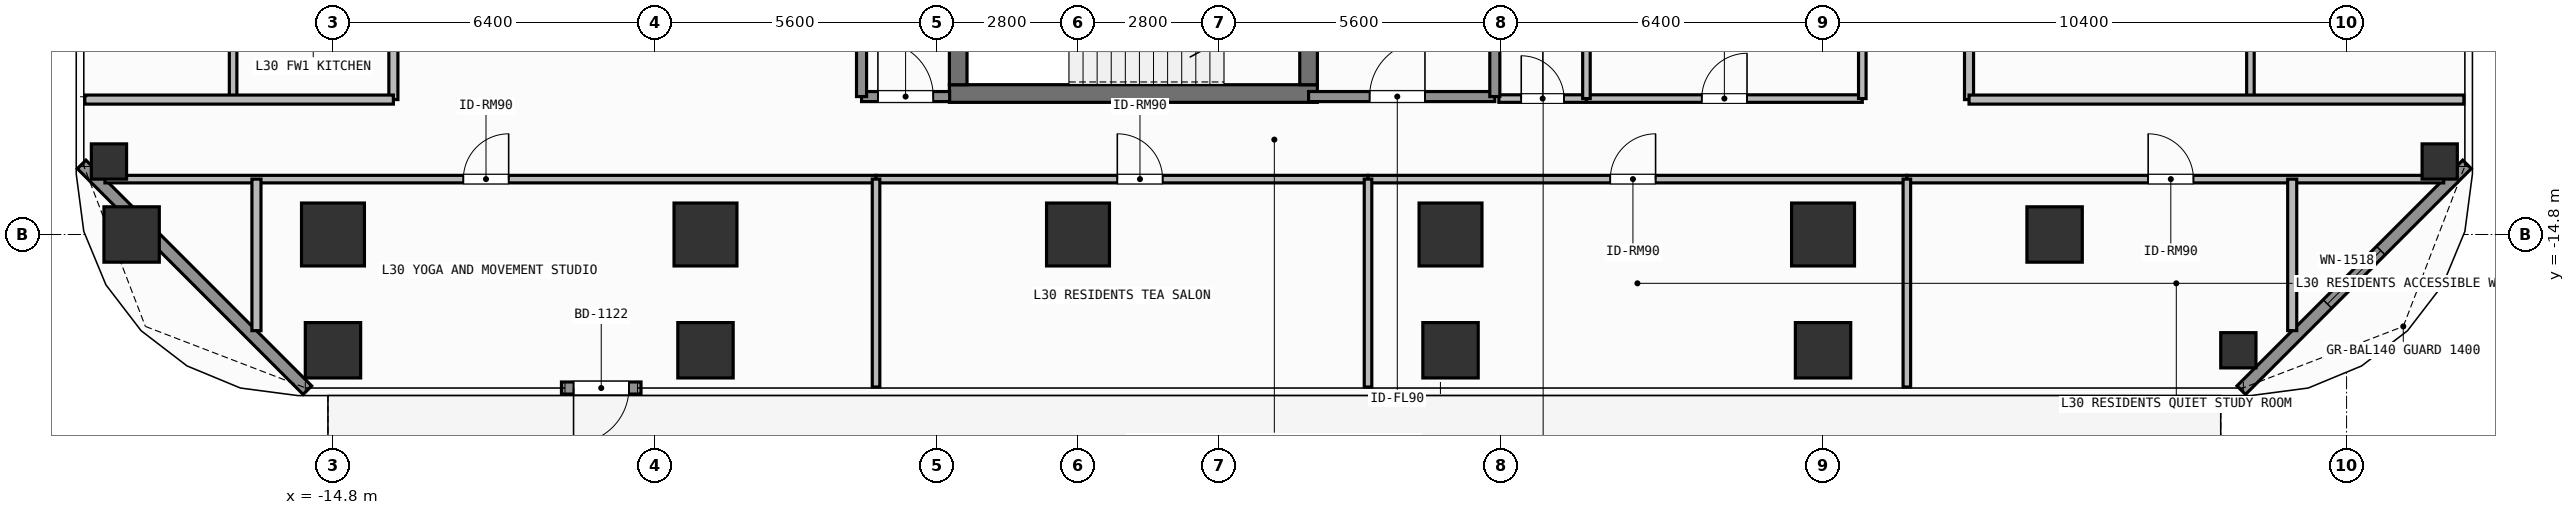
"""IFC4 building model, lengths in metres.
Left out: names, types, materials, properties, quantities, classifications, styles, units other than length and angle.
Written with IfcOpenShell. Run it as: python <this file> out.ifc"""

import sys

from ifc_helpers import new_model, si_unit, direction, frame, frame_2d, origin, origin_2d, place, context, subcontext, project, spatial, rectangle, hollow_rectangle, extrude, element, fill, save


model = new_model("IFC4")
c1 = context("Model", 3, precision=1e-05, world=origin(), true_north=direction((0.0, 1.0)))
c2 = subcontext(c1, "Body", "Model", "MODEL_VIEW")
j1 = project(units=[si_unit("LENGTHUNIT", "METRE"), si_unit("PLANEANGLEUNIT", "RADIAN")], contexts=[c1])
p1 = place(None, origin())
s1 = spatial("IfcSite", under=j1, at=p1, CompositionType="ELEMENT")
p2 = place(p1, origin())
s2 = spatial("IfcBuilding", under=s1, at=p2, CompositionType="ELEMENT")
p3 = place(p2, frame((0.0, 0.0, 121.2)))
s3 = spatial("IfcBuildingStorey", under=s2, at=p3, CompositionType="ELEMENT", Elevation=121.2)
p4 = place(p3, frame((-2.555, -12.0, 0.0), z_axis=(0.0, 0.0, 1.0), x_axis=(1.0, 0.0, 0.0)))
e1 = element("IfcWall", 1, at=p4, inside=s3, PredefinedType="SHEAR", context=c2, shape_type="SweptSolid", body=[
    extrude(rectangle(XDim=7.31, YDim=0.35, at=frame_2d((3.655, 0.0))), origin(), (0.0, 0.0, 1.0), 3.9),
])
p5 = place(p3, frame((-2.38, -11.825, 0.0), z_axis=(0.0, 0.0, 1.0), x_axis=(0.0, 1.0, 0.0)))
e2 = element("IfcWall", 2, at=p5, inside=s3, PredefinedType="SHEAR", context=c2, shape_type="SweptSolid", body=[
    extrude(rectangle(XDim=2.925, YDim=0.35, at=frame_2d((1.462, 0.0))), origin(), (0.0, 0.0, 1.0), 3.9),
])
p6 = place(p3, frame((4.58, -8.9, 0.0), z_axis=(0.0, 0.0, 1.0), x_axis=(0.0, -1.0, 0.0)))
e3 = element("IfcWall", 3, at=p6, inside=s3, PredefinedType="SHEAR", context=c2, shape_type="SweptSolid", body=[
    extrude(rectangle(XDim=2.925, YDim=0.35, at=frame_2d((1.462, 0.0))), origin(), (0.0, 0.0, 1.0), 3.9),
])
p7 = place(p6, frame((0.913, 0.0, 0.0)))
e4 = element("IfcOpeningElement", 4, at=p7, cuts=e3, PredefinedType="OPENING", context=c2, shape_type="SweptSolid", body=[
    extrude(rectangle(XDim=1.1, YDim=2.15, at=frame_2d((0.55, 1.075))), frame((0.0, 0.185, 0.0), z_axis=(0.0, -1.0, 0.0), x_axis=(1.0, 0.0, 0.0)), (0.0, 0.0, 1.0), 0.37),
])
for number, where, z_axis, x_axis in (
    (5, (-14.8, -14.8, 0.0), (0.0, 0.0, 1.0), (1.0, 0.0, 0.0)),
    (6, (-7.4, -14.8, 0.0), (0.0, 0.0, 1.0), (1.0, 0.0, 0.0)),
    (7, (0.0, -14.8, 0.0), (0.0, 0.0, 1.0), (1.0, 0.0, 0.0)),
    (8, (7.4, -14.8, 0.0), (0.0, 0.0, 1.0), (1.0, 0.0, 0.0)),
    (9, (14.8, -14.8, 0.0), (0.0, 0.0, 1.0), (1.0, 0.0, 0.0)),
):
    element("IfcColumn", number, at=place(p3, frame(where, z_axis=z_axis, x_axis=x_axis)), inside=s3, PredefinedType="COLUMN", context=c2, shape_type="SweptSolid", body=[
        extrude(rectangle(XDim=1.25, YDim=1.25, at=origin_2d()), origin(), (0.0, 0.0, 1.0), 3.9),
    ])
for number, where, z_axis, x_axis in (
    (10, (-18.8, -14.8, 0.0), (0.0, 0.0, 1.0), (1.0, 0.0, 0.0)),
    (11, (19.4, -14.8, 0.0), (0.0, 0.0, 1.0), (1.0, 0.0, 0.0)),
    (12, (-14.8, -17.1, 0.0), (0.0, 0.0, 1.0), (1.0, 0.0, 0.0)),
    (13, (-7.4, -17.1, 0.0), (0.0, 0.0, 1.0), (1.0, 0.0, 0.0)),
    (14, (7.4, -17.1, 0.0), (0.0, 0.0, 1.0), (1.0, 0.0, 0.0)),
    (15, (14.8, -17.1, 0.0), (0.0, 0.0, 1.0), (1.0, 0.0, 0.0)),
):
    element("IfcColumn", number, at=place(p3, frame(where, z_axis=z_axis, x_axis=x_axis)), inside=s3, PredefinedType="COLUMN", context=c2, shape_type="SweptSolid", body=[
        extrude(rectangle(XDim=1.1, YDim=1.1, at=origin_2d()), origin(), (0.0, 0.0, 1.0), 3.9),
    ])
for number, where, z_axis, x_axis in (
    (16, (23.05, -17.1, 0.0), (0.0, 0.0, 1.0), (1.0, 0.0, 0.0)),
    (17, (-19.25, -13.35, 0.0), (0.0, 0.0, 1.0), (1.0, 0.0, 0.0)),
    (18, (27.05, -13.35, 0.0), (0.0, 0.0, 1.0), (1.0, 0.0, 0.0)),
):
    element("IfcColumn", number, at=place(p3, frame(where, z_axis=z_axis, x_axis=x_axis)), inside=s3, PredefinedType="COLUMN", context=c2, shape_type="SweptSolid", body=[
        extrude(hollow_rectangle(XDim=0.7, YDim=0.7, WallThickness=0.032, at=origin_2d()), origin(), (0.0, 0.0, 1.0), 3.9),
    ])
p8 = place(p3, frame((-8.681, -17.85, 0.0), z_axis=(0.0, 0.0, 1.0), x_axis=(-1.0, 0.0, 0.0)))
e19 = element("IfcWall", 19, at=p8, inside=s3, PredefinedType="SOLIDWALL", context=c2, shape_type="SweptSolid", body=[
    extrude(rectangle(XDim=1.58, YDim=0.24, at=frame_2d((0.79, 0.0))), origin(), (0.0, 0.0, 1.0), 3.68),
])
p9 = place(p8, frame((0.24, 0.0, 0.0)))
e20 = element("IfcOpeningElement", 20, at=p9, cuts=e19, PredefinedType="OPENING", context=c2, shape_type="SweptSolid", body=[
    extrude(rectangle(XDim=1.1, YDim=2.2, at=frame_2d((0.55, 1.1))), frame((0.0, 0.13, 0.0), z_axis=(0.0, -1.0, 0.0), x_axis=(1.0, 0.0, 0.0)), (0.0, 0.0, 1.0), 0.26),
])
p10 = place(p3, frame((-15.308, -17.892, 0.0), z_axis=(0.0, 0.0, 1.0), x_axis=(-0.707126027686, 0.707087534163, 0.0)))
e21 = element("IfcWall", 21, at=p10, inside=s3, PredefinedType="SOLIDWALL", context=c2, shape_type="SweptSolid", body=[
    extrude(rectangle(XDim=6.342, YDim=0.24, at=frame_2d((3.171, 0.0))), origin(), (0.0, 0.0, 1.0), 3.68),
])
p11 = place(p3, frame((27.592, -13.408, 0.0), z_axis=(0.0, 0.0, 1.0), x_axis=(-0.707106781187, -0.707106781187, 0.0)))
e22 = element("IfcWall", 22, at=p11, inside=s3, PredefinedType="SOLIDWALL", context=c2, shape_type="SweptSolid", body=[
    extrude(rectangle(XDim=6.342, YDim=0.24, at=frame_2d((3.171, 0.0))), origin(), (0.0, 0.0, 1.0), 3.68),
])
p12 = place(p11, frame((2.421, 0.0, 0.8)))
e23 = element("IfcOpeningElement", 23, at=p12, cuts=e22, PredefinedType="OPENING", context=c2, shape_type="SweptSolid", body=[
    extrude(rectangle(XDim=1.5, YDim=1.85, at=frame_2d((0.75, 0.925))), frame((0.0, 0.13, 0.0), z_axis=(0.0, -1.0, 0.0), x_axis=(1.0, 0.0, 0.0)), (0.0, 0.0, 1.0), 0.26),
])
p13 = place(p3, frame((4.58, -12.06, 0.0), z_axis=(0.0, 0.0, 1.0), x_axis=(1.0, 0.0, 0.0)))
e24 = element("IfcWall", 24, at=p13, inside=s3, PredefinedType="SOLIDWALL", context=c2, shape_type="SweptSolid", body=[
    extrude(rectangle(XDim=3.7, YDim=0.2, at=frame_2d((1.85, 0.0))), origin(), (0.0, 0.0, 1.0), 3.68),
])
p14 = place(p13, frame((1.212, 0.0, 0.0)))
e25 = element("IfcOpeningElement", 25, at=p14, cuts=e24, PredefinedType="OPENING", context=c2, shape_type="SweptSolid", body=[
    extrude(rectangle(XDim=1.1, YDim=2.15, at=frame_2d((0.55, 1.075))), frame((0.0, 0.11, 0.0), z_axis=(0.0, -1.0, 0.0), x_axis=(1.0, 0.0, 0.0)), (0.0, 0.0, 1.0), 0.22),
])
p15 = place(p3, frame((-4.3, -12.06, 0.0), z_axis=(0.0, 0.0, 1.0), x_axis=(1.0, 0.0, 0.0)))
e26 = element("IfcWall", 26, at=p15, inside=s3, PredefinedType="SOLIDWALL", context=c2, shape_type="SweptSolid", body=[
    extrude(rectangle(XDim=1.75, YDim=0.2, at=frame_2d((0.875, 0.0))), origin(), (0.0, 0.0, 1.0), 3.68),
])
p16 = place(p15, frame((0.325, 0.0, 0.0)))
e27 = element("IfcOpeningElement", 27, at=p16, cuts=e26, PredefinedType="OPENING", context=c2, shape_type="SweptSolid", body=[
    extrude(rectangle(XDim=1.1, YDim=2.15, at=frame_2d((0.55, 1.075))), frame((0.0, 0.11, 0.0), z_axis=(0.0, -1.0, 0.0), x_axis=(1.0, 0.0, 0.0)), (0.0, 0.0, 1.0), 0.22),
])
p17 = place(p3, frame((8.36, -12.1, 0.0), z_axis=(0.0, 0.0, 1.0), x_axis=(1.0, 0.0, 0.0)))
e28 = element("IfcWall", 28, at=p17, inside=s3, PredefinedType="PARTITIONING", context=c2, shape_type="SweptSolid", body=[
    extrude(rectangle(XDim=1.74, YDim=0.15, at=frame_2d((0.87, 0.0))), origin(), (0.0, 0.0, 1.0), 3.68),
])
p18 = place(p17, frame((0.445, 0.0, 0.0)))
e29 = element("IfcOpeningElement", 29, at=p18, cuts=e28, PredefinedType="OPENING", context=c2, shape_type="SweptSolid", body=[
    extrude(rectangle(XDim=0.85, YDim=2.1, at=frame_2d((0.425, 1.05))), frame((0.0, 0.085, 0.0), z_axis=(0.0, -1.0, 0.0), x_axis=(1.0, 0.0, 0.0)), (0.0, 0.0, 1.0), 0.17),
])
p19 = place(p3, frame((10.1, -12.1, 0.0), z_axis=(0.0, 0.0, 1.0), x_axis=(1.0, 0.0, 0.0)))
e30 = element("IfcWall", 30, at=p19, inside=s3, PredefinedType="PARTITIONING", context=c2, shape_type="SweptSolid", body=[
    extrude(rectangle(XDim=5.48, YDim=0.15, at=frame_2d((2.74, 0.0))), origin(), (0.0, 0.0, 1.0), 3.68),
])
p20 = place(p19, frame((2.29, 0.0, 0.0)))
e31 = element("IfcOpeningElement", 31, at=p20, cuts=e30, PredefinedType="OPENING", context=c2, shape_type="SweptSolid", body=[
    extrude(rectangle(XDim=0.9, YDim=2.1, at=frame_2d((0.45, 1.05))), frame((0.0, 0.085, 0.0), z_axis=(0.0, -1.0, 0.0), x_axis=(1.0, 0.0, 0.0)), (0.0, 0.0, 1.0), 0.17),
])
p21 = place(p3, frame((-19.33, -13.7, 0.0), z_axis=(0.0, 0.0, 1.0), x_axis=(1.0, 0.0, 0.0)))
e32 = element("IfcWall", 32, at=p21, inside=s3, PredefinedType="PARTITIONING", context=c2, shape_type="SweptSolid", body=[
    extrude(rectangle(XDim=15.318, YDim=0.15, at=frame_2d((7.659, 0.0))), origin(), (0.0, 0.0, 1.0), 3.68),
])
p22 = place(p21, frame((7.12, 0.0, 0.0)))
e33 = element("IfcOpeningElement", 33, at=p22, cuts=e32, PredefinedType="OPENING", context=c2, shape_type="SweptSolid", body=[
    extrude(rectangle(XDim=0.9, YDim=2.1, at=frame_2d((0.45, 1.05))), frame((0.0, 0.085, 0.0), z_axis=(0.0, -1.0, 0.0), x_axis=(1.0, 0.0, 0.0)), (0.0, 0.0, 1.0), 0.17),
])
p23 = place(p3, frame((-4.012, -13.7, 0.0), z_axis=(0.0, 0.0, 1.0), x_axis=(1.0, 0.0, 0.0)))
e34 = element("IfcWall", 34, at=p23, inside=s3, PredefinedType="PARTITIONING", context=c2, shape_type="SweptSolid", body=[
    extrude(rectangle(XDim=9.773, YDim=0.15, at=frame_2d((4.886, 0.0))), origin(), (0.0, 0.0, 1.0), 3.68),
])
p24 = place(p23, frame((4.793, 0.0, 0.0)))
e35 = element("IfcOpeningElement", 35, at=p24, cuts=e34, PredefinedType="OPENING", context=c2, shape_type="SweptSolid", body=[
    extrude(rectangle(XDim=0.9, YDim=2.1, at=frame_2d((0.45, 1.05))), frame((0.0, 0.085, 0.0), z_axis=(0.0, -1.0, 0.0), x_axis=(1.0, 0.0, 0.0)), (0.0, 0.0, 1.0), 0.17),
])
p25 = place(p3, frame((5.761, -13.7, 0.0), z_axis=(0.0, 0.0, 1.0), x_axis=(1.0, 0.0, 0.0)))
e36 = element("IfcWall", 36, at=p25, inside=s3, PredefinedType="PARTITIONING", context=c2, shape_type="SweptSolid", body=[
    extrude(rectangle(XDim=10.704, YDim=0.15, at=frame_2d((5.352, 0.0))), origin(), (0.0, 0.0, 1.0), 3.68),
])
p26 = place(p25, frame((4.812, 0.0, 0.0)))
e37 = element("IfcOpeningElement", 37, at=p26, cuts=e36, PredefinedType="OPENING", context=c2, shape_type="SweptSolid", body=[
    extrude(rectangle(XDim=0.9, YDim=2.1, at=frame_2d((0.45, 1.05))), frame((0.0, 0.085, 0.0), z_axis=(0.0, -1.0, 0.0), x_axis=(1.0, 0.0, 0.0)), (0.0, 0.0, 1.0), 0.17),
])
p27 = place(p3, frame((16.465, -13.7, 0.0), z_axis=(0.0, 0.0, 1.0), x_axis=(1.0, 0.0, 0.0)))
e38 = element("IfcWall", 38, at=p27, inside=s3, PredefinedType="PARTITIONING", context=c2, shape_type="SweptSolid", body=[
    extrude(rectangle(XDim=10.665, YDim=0.15, at=frame_2d((5.333, 0.0))), origin(), (0.0, 0.0, 1.0), 3.68),
])
p28 = place(p27, frame((4.793, 0.0, 0.0)))
e39 = element("IfcOpeningElement", 39, at=p28, cuts=e38, PredefinedType="OPENING", context=c2, shape_type="SweptSolid", body=[
    extrude(rectangle(XDim=0.9, YDim=2.1, at=frame_2d((0.45, 1.05))), frame((0.0, 0.085, 0.0), z_axis=(0.0, -1.0, 0.0), x_axis=(1.0, 0.0, 0.0)), (0.0, 0.0, 1.0), 0.17),
])
p29 = place(p3, frame((-13.6, -12.12, 0.0), z_axis=(0.0, 0.0, 1.0), x_axis=(0.0, 1.0, 0.0)))
e40 = element("IfcWall", 40, at=p29, inside=s3, PredefinedType="PARTITIONING", context=c2, shape_type="SweptSolid", body=[
    extrude(rectangle(XDim=13.138, YDim=0.18, at=frame_2d((6.569, 0.0))), origin(), (0.0, 0.0, 1.0), 3.68),
])
p30 = place(p29, frame((5.711, 0.0, 0.0)))
e41 = element("IfcOpeningElement", 41, at=p30, cuts=e40, PredefinedType="OPENING", context=c2, shape_type="SweptSolid", body=[
    extrude(rectangle(XDim=1.0, YDim=2.2, at=frame_2d((0.5, 1.1))), frame((0.0, 0.1, 0.0), z_axis=(0.0, -1.0, 0.0), x_axis=(1.0, 0.0, 0.0)), (0.0, 0.0, 1.0), 0.2),
])
p31 = place(p3, frame((17.7, -12.12, 0.0), z_axis=(0.0, 0.0, 1.0), x_axis=(0.0, 1.0, 0.0)))
e42 = element("IfcWall", 42, at=p31, inside=s3, PredefinedType="PARTITIONING", context=c2, shape_type="SweptSolid", body=[
    extrude(rectangle(XDim=24.24, YDim=0.18, at=frame_2d((12.12, 0.0))), origin(), (0.0, 0.0, 1.0), 3.68),
])
p32 = place(p31, frame((11.62, 0.0, 0.0)))
e43 = element("IfcOpeningElement", 43, at=p32, cuts=e42, PredefinedType="OPENING", context=c2, shape_type="SweptSolid", body=[
    extrude(rectangle(XDim=1.0, YDim=2.2, at=frame_2d((0.5, 1.1))), frame((0.0, 0.1, 0.0), z_axis=(0.0, -1.0, 0.0), x_axis=(1.0, 0.0, 0.0)), (0.0, 0.0, 1.0), 0.2),
])
for number, where, z_axis, x_axis in (
    (44, (8.28, -12.06, 0.0), (0.0, 0.0, 1.0), (0.0, 1.0, 0.0)),
    (45, (-4.3, -12.06, 0.0), (0.0, 0.0, 1.0), (0.0, 1.0, 0.0)),
):
    element("IfcWall", number, at=place(p3, frame(where, z_axis=z_axis, x_axis=x_axis)), inside=s3, PredefinedType="SOLIDWALL", context=c2, shape_type="SweptSolid", body=[
        extrude(rectangle(XDim=3.185, YDim=0.2, at=frame_2d((1.593, 0.0))), origin(), (0.0, 0.0, 1.0), 3.68),
    ])
p33 = place(p3, frame((10.1, -12.1, 0.0), z_axis=(0.0, 0.0, 1.0), x_axis=(0.0, 1.0, 0.0)))
e46 = element("IfcWall", 46, at=p33, inside=s3, PredefinedType="PARTITIONING", context=c2, shape_type="SweptSolid", body=[
    extrude(rectangle(XDim=2.35, YDim=0.15, at=frame_2d((1.175, 0.0))), origin(), (0.0, 0.0, 1.0), 3.68),
])
p34 = place(p3, frame((15.58, -12.1, 0.0), z_axis=(0.0, 0.0, 1.0), x_axis=(0.0, 1.0, 0.0)))
e47 = element("IfcWall", 47, at=p34, inside=s3, PredefinedType="PARTITIONING", context=c2, shape_type="SweptSolid", body=[
    extrude(rectangle(XDim=6.25, YDim=0.15, at=frame_2d((3.125, 0.0))), origin(), (0.0, 0.0, 1.0), 3.68),
])
for number, where, z_axis, x_axis in (
    (48, (-16.32, -16.71, 0.0), (0.0, 0.0, 1.0), (0.0, 1.0, 0.0)),
    (49, (24.12, -16.71, 0.0), (0.0, 0.0, 1.0), (0.0, 1.0, 0.0)),
):
    element("IfcWall", number, at=place(p3, frame(where, z_axis=z_axis, x_axis=x_axis)), inside=s3, PredefinedType="PARTITIONING", context=c2, shape_type="SweptSolid", body=[
        extrude(rectangle(XDim=3.01, YDim=0.18, at=frame_2d((1.505, 0.0))), origin(), (0.0, 0.0, 1.0), 3.68),
    ])
for number, where, z_axis, x_axis in (
    (50, (-4.012, -17.83, 0.0), (0.0, 0.0, 1.0), (0.0, 1.0, 0.0)),
    (51, (5.761, -17.83, 0.0), (0.0, 0.0, 1.0), (0.0, 1.0, 0.0)),
    (52, (16.465, -17.83, 0.0), (0.0, 0.0, 1.0), (0.0, 1.0, 0.0)),
):
    element("IfcWall", number, at=place(p3, frame(where, z_axis=z_axis, x_axis=x_axis)), inside=s3, PredefinedType="PARTITIONING", context=c2, shape_type="SweptSolid", body=[
        extrude(rectangle(XDim=4.13, YDim=0.15, at=frame_2d((2.065, 0.0))), origin(), (0.0, 0.0, 1.0), 3.68),
    ])
p35 = place(p3, frame((-16.784, -12.12, 0.0), z_axis=(0.0, 0.0, 1.0), x_axis=(0.0, 1.0, 0.0)))
e53 = element("IfcWall", 53, at=p35, inside=s3, PredefinedType="PARTITIONING", context=c2, shape_type="SweptSolid", body=[
    extrude(rectangle(XDim=3.726, YDim=0.15, at=frame_2d((1.863, 0.0))), origin(), (0.0, 0.0, 1.0), 3.68),
])
p36 = place(p3, frame((-19.73, -12.12, 0.0), z_axis=(0.0, 0.0, 1.0), x_axis=(1.0, 0.0, 0.0)))
e54 = element("IfcWall", 54, at=p36, inside=s3, PredefinedType="PARTITIONING", context=c2, shape_type="SweptSolid", body=[
    extrude(rectangle(XDim=6.13, YDim=0.18, at=frame_2d((3.065, 0.0))), origin(), (0.0, 0.0, 1.0), 3.68),
])
p37 = place(p3, frame((23.29, -12.12, 0.0), z_axis=(0.0, 0.0, 1.0), x_axis=(0.0, 1.0, 0.0)))
e55 = element("IfcWall", 55, at=p37, inside=s3, PredefinedType="PARTITIONING", context=c2, shape_type="SweptSolid", body=[
    extrude(rectangle(XDim=6.684, YDim=0.15, at=frame_2d((3.342, 0.0))), origin(), (0.0, 0.0, 1.0), 3.68),
])
p38 = place(p3, frame((17.7, -12.12, 0.0), z_axis=(0.0, 0.0, 1.0), x_axis=(1.0, 0.0, 0.0)))
e56 = element("IfcWall", 56, at=p38, inside=s3, PredefinedType="PARTITIONING", context=c2, shape_type="SweptSolid", body=[
    extrude(rectangle(XDim=9.83, YDim=0.18, at=frame_2d((4.915, 0.0))), origin(), (0.0, 0.0, 1.0), 3.68),
])
p39 = place(p9, origin())
e57 = element("IfcDoor", 57, at=p39, inside=s3, OperationType="SINGLE_SWING_RIGHT", PredefinedType="DOOR", context=c2, shape_type="SweptSolid", body=[
    extrude(rectangle(XDim=1.1, YDim=2.2, at=frame_2d((0.55, 1.1))), frame((0.0, 0.025, 0.0), z_axis=(0.0, -1.0, 0.0), x_axis=(1.0, 0.0, 0.0)), (0.0, 0.0, 1.0), 0.05),
])
fill(e20, e57)
p40 = place(p12, origin())
e58 = element("IfcWindow", 58, at=p40, inside=s3, PartitioningType="SINGLE_PANEL", PredefinedType="WINDOW", context=c2, shape_type="SweptSolid", body=[
    extrude(rectangle(XDim=1.5, YDim=1.85, at=frame_2d((0.75, 0.925))), frame((0.0, 0.03, 0.0), z_axis=(0.0, -1.0, 0.0), x_axis=(1.0, 0.0, 0.0)), (0.0, 0.0, 1.0), 0.06),
])
fill(e23, e58)
p41 = place(p14, origin())
e59 = element("IfcDoor", 59, at=p41, inside=s3, OperationType="SINGLE_SWING_RIGHT", PredefinedType="DOOR", context=c2, shape_type="SweptSolid", body=[
    extrude(rectangle(XDim=1.1, YDim=2.15, at=frame_2d((0.55, 1.075))), frame((0.0, 0.025, 0.0), z_axis=(0.0, -1.0, 0.0), x_axis=(1.0, 0.0, 0.0)), (0.0, 0.0, 1.0), 0.05),
])
fill(e25, e59)
p42 = place(p16, origin())
e60 = element("IfcDoor", 60, at=p42, inside=s3, OperationType="SINGLE_SWING_LEFT", PredefinedType="DOOR", context=c2, shape_type="SweptSolid", body=[
    extrude(rectangle(XDim=1.1, YDim=2.15, at=frame_2d((0.55, 1.075))), frame((0.0, 0.025, 0.0), z_axis=(0.0, -1.0, 0.0), x_axis=(1.0, 0.0, 0.0)), (0.0, 0.0, 1.0), 0.05),
])
fill(e27, e60)
p43 = place(p18, origin())
e61 = element("IfcDoor", 61, at=p43, inside=s3, OperationType="SINGLE_SWING_LEFT", PredefinedType="DOOR", context=c2, shape_type="SweptSolid", body=[
    extrude(rectangle(XDim=0.85, YDim=2.1, at=frame_2d((0.425, 1.05))), frame((0.0, 0.025, 0.0), z_axis=(0.0, -1.0, 0.0), x_axis=(1.0, 0.0, 0.0)), (0.0, 0.0, 1.0), 0.05),
])
fill(e29, e61)
p44 = place(p20, origin())
e62 = element("IfcDoor", 62, at=p44, inside=s3, OperationType="SINGLE_SWING_RIGHT", PredefinedType="DOOR", context=c2, shape_type="SweptSolid", body=[
    extrude(rectangle(XDim=0.9, YDim=2.1, at=frame_2d((0.45, 1.05))), frame((0.0, 0.025, 0.0), z_axis=(0.0, -1.0, 0.0), x_axis=(1.0, 0.0, 0.0)), (0.0, 0.0, 1.0), 0.05),
])
fill(e31, e62)
p45 = place(p22, origin())
e63 = element("IfcDoor", 63, at=p45, inside=s3, OperationType="SINGLE_SWING_RIGHT", PredefinedType="DOOR", context=c2, shape_type="SweptSolid", body=[
    extrude(rectangle(XDim=0.9, YDim=2.1, at=frame_2d((0.45, 1.05))), frame((0.0, 0.025, 0.0), z_axis=(0.0, -1.0, 0.0), x_axis=(1.0, 0.0, 0.0)), (0.0, 0.0, 1.0), 0.05),
])
fill(e33, e63)
p46 = place(p24, origin())
e64 = element("IfcDoor", 64, at=p46, inside=s3, OperationType="SINGLE_SWING_LEFT", PredefinedType="DOOR", context=c2, shape_type="SweptSolid", body=[
    extrude(rectangle(XDim=0.9, YDim=2.1, at=frame_2d((0.45, 1.05))), frame((0.0, 0.025, 0.0), z_axis=(0.0, -1.0, 0.0), x_axis=(1.0, 0.0, 0.0)), (0.0, 0.0, 1.0), 0.05),
])
fill(e35, e64)
p47 = place(p26, origin())
e65 = element("IfcDoor", 65, at=p47, inside=s3, OperationType="SINGLE_SWING_RIGHT", PredefinedType="DOOR", context=c2, shape_type="SweptSolid", body=[
    extrude(rectangle(XDim=0.9, YDim=2.1, at=frame_2d((0.45, 1.05))), frame((0.0, 0.025, 0.0), z_axis=(0.0, -1.0, 0.0), x_axis=(1.0, 0.0, 0.0)), (0.0, 0.0, 1.0), 0.05),
])
fill(e37, e65)
p48 = place(p28, origin())
e66 = element("IfcDoor", 66, at=p48, inside=s3, OperationType="SINGLE_SWING_LEFT", PredefinedType="DOOR", context=c2, shape_type="SweptSolid", body=[
    extrude(rectangle(XDim=0.9, YDim=2.1, at=frame_2d((0.45, 1.05))), frame((0.0, 0.025, 0.0), z_axis=(0.0, -1.0, 0.0), x_axis=(1.0, 0.0, 0.0)), (0.0, 0.0, 1.0), 0.05),
])
fill(e39, e66)
save(model, sys.argv[1])
